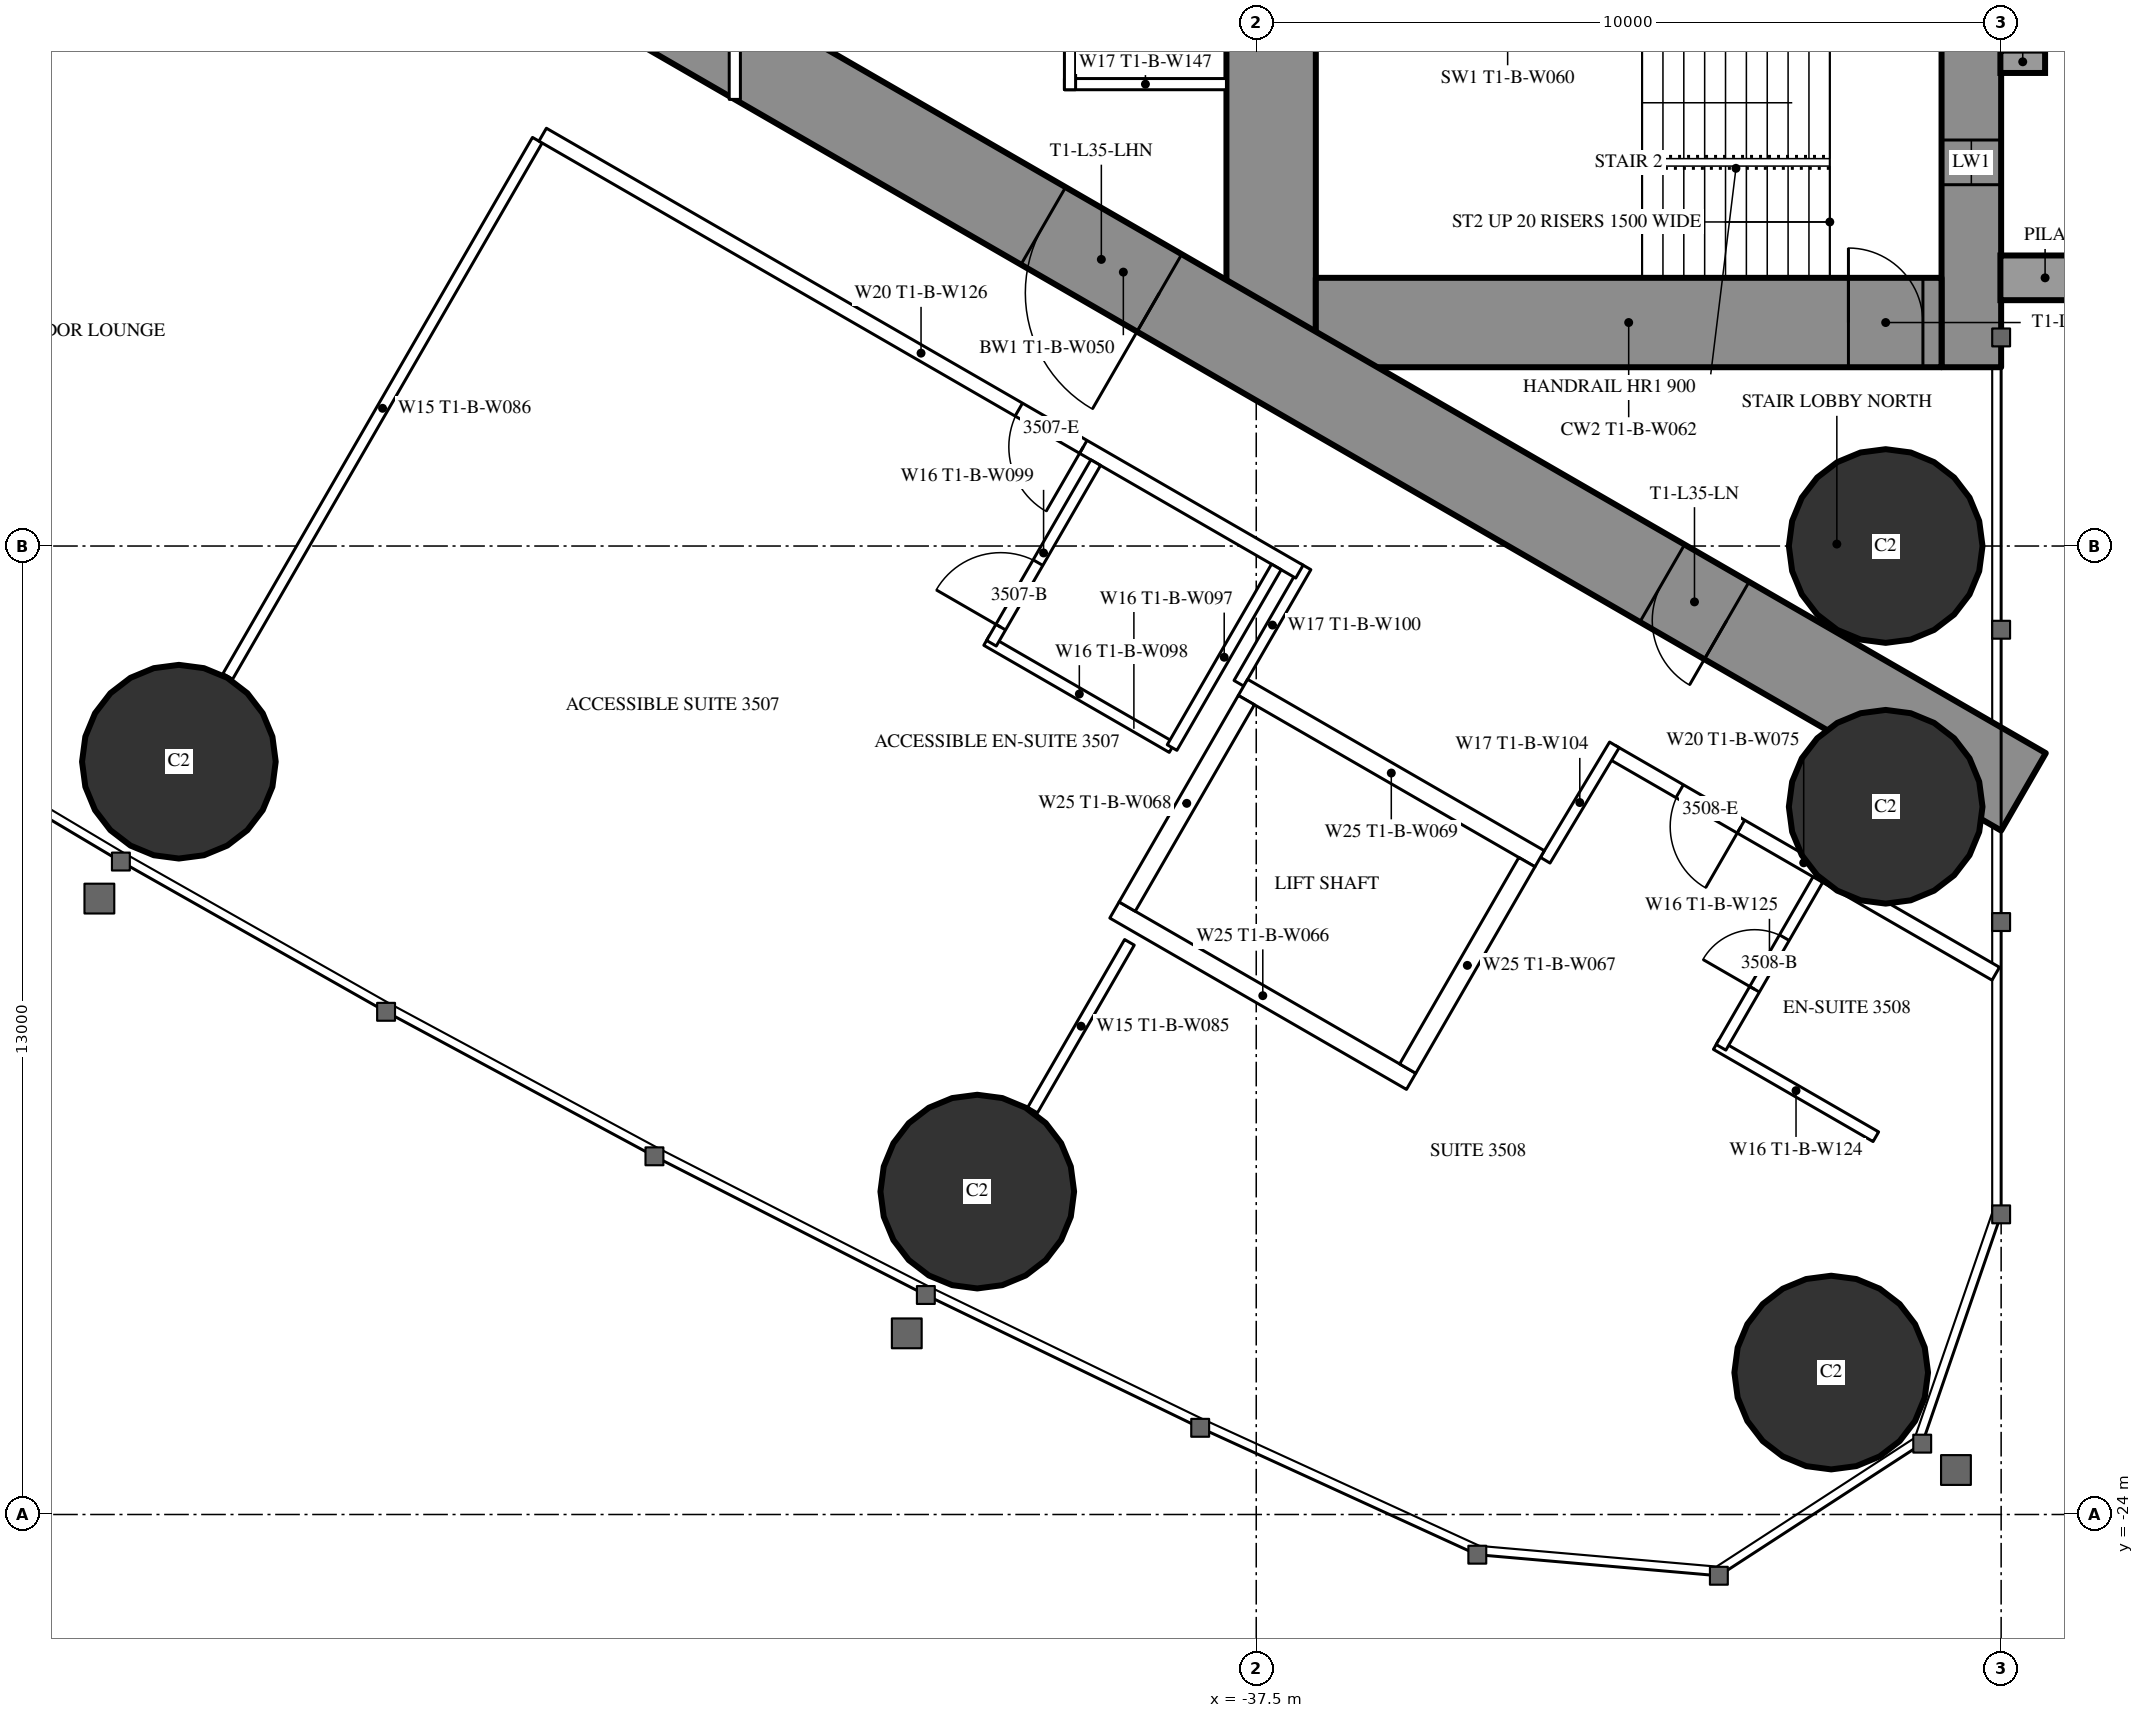
"""IFC4 building model, lengths in metres.
Left out: names, types, materials, properties, quantities, classifications, styles, units other than length and angle.
Written with IfcOpenShell. Run it as: python <this file> out.ifc"""

import sys

from ifc_helpers import new_model, si_unit, direction, frame, frame_2d, origin, origin_2d, place, context, subcontext, project, spatial, rectangle, hollow_circle, extrude, element, fill, save


model = new_model("IFC4")
c1 = context("Model", 3, precision=1e-05, world=origin(), true_north=direction((0.0, 1.0)))
c2 = subcontext(c1, "Body", "Model", "MODEL_VIEW")
j1 = project(units=[si_unit("LENGTHUNIT", "METRE"), si_unit("PLANEANGLEUNIT", "RADIAN")], contexts=[c1])
p1 = place(None, origin())
s1 = spatial("IfcSite", under=j1, at=p1, CompositionType="ELEMENT")
p2 = place(p1, origin())
s2 = spatial("IfcBuilding", under=s1, at=p2, CompositionType="ELEMENT")
p3 = place(p2, frame((0.0, 0.0, 132.6)))
s3 = spatial("IfcBuildingStorey", under=s2, at=p3, CompositionType="ELEMENT", Elevation=132.6)
for number, where, z_axis, x_axis in (
    (1, (-29.781, -22.095, 0.0), (0.0, 0.0, 1.0), (1.0, 0.0, 0.0)),
    (2, (-29.05, -11.0, 0.0), (0.0, 0.0, 1.0), (1.0, 0.0, 0.0)),
    (3, (-29.05, -14.5, 0.0), (0.0, 0.0, 1.0), (1.0, 0.0, 0.0)),
    (4, (-51.963, -13.895, 0.0), (0.0, 0.0, 1.0), (1.0, 0.0, 0.0)),
    (5, (-41.245, -19.666, 0.0), (0.0, 0.0, 1.0), (1.0, 0.0, 0.0)),
):
    element("IfcColumn", number, at=place(p3, frame(where, z_axis=z_axis, x_axis=x_axis)), inside=s3, PredefinedType="COLUMN", context=c2, shape_type="SweptSolid", body=[
        extrude(hollow_circle(Radius=1.3, WallThickness=0.1, at=origin_2d()), origin(), (0.0, 0.0, 1.0), 3.5),
    ])
p4 = place(p3, frame((-27.9, 8.6, 0.0), z_axis=(0.0, 0.0, 1.0), x_axis=(0.0, -1.0, 0.0)))
e6 = element("IfcWall", 6, at=p4, inside=s3, PredefinedType="SHEAR", context=c2, shape_type="SweptSolid", body=[
    extrude(rectangle(XDim=17.2, YDim=0.8, at=frame_2d((8.6, 0.0))), origin(), (0.0, 0.0, 1.0), 3.5),
])
p5 = place(p4, frame((2.45, 0.0, 0.6)))
e7 = element("IfcOpeningElement", 7, at=p5, cuts=e6, PredefinedType="OPENING", context=c2, shape_type="SweptSolid", body=[
    extrude(rectangle(XDim=0.6, YDim=2.1, at=frame_2d((0.3, 1.05))), frame((0.0, 0.41, 0.0), z_axis=(0.0, -1.0, 0.0), x_axis=(1.0, 0.0, 0.0)), (0.0, 0.0, 1.0), 0.82),
])
p6 = place(p4, frame((14.15, 0.0, 0.6)))
e8 = element("IfcOpeningElement", 8, at=p6, cuts=e6, PredefinedType="OPENING", context=c2, shape_type="SweptSolid", body=[
    extrude(rectangle(XDim=0.6, YDim=2.1, at=frame_2d((0.3, 1.05))), frame((0.0, 0.41, 0.0), z_axis=(0.0, -1.0, 0.0), x_axis=(1.0, 0.0, 0.0)), (0.0, 0.0, 1.0), 0.82),
])
p7 = place(p3, frame((-37.3, 8.6, 0.0), z_axis=(0.0, 0.0, 1.0), x_axis=(0.0, -1.0, 0.0)))
e9 = element("IfcWall", 9, at=p7, inside=s3, PredefinedType="SHEAR", context=c2, shape_type="SweptSolid", body=[
    extrude(rectangle(XDim=17.2, YDim=1.2, at=frame_2d((8.6, 0.0))), origin(), (0.0, 0.0, 1.0), 3.5),
])
p8 = place(p7, frame((7.7, 0.0, 0.0)))
e10 = element("IfcOpeningElement", 10, at=p8, cuts=e9, PredefinedType="OPENING", context=c2, shape_type="SweptSolid", body=[
    extrude(rectangle(XDim=1.8, YDim=2.2, at=frame_2d((0.9, 1.1))), frame((0.0, 0.61, 0.0), z_axis=(0.0, -1.0, 0.0), x_axis=(1.0, 0.0, 0.0)), (0.0, 0.0, 1.0), 1.22),
])
p9 = place(p3, frame((-28.3, -8.0, 0.0), z_axis=(0.0, 0.0, 1.0), x_axis=(-1.0, 0.0, 0.0)))
e11 = element("IfcWall", 11, at=p9, inside=s3, PredefinedType="SHEAR", context=c2, shape_type="SweptSolid", body=[
    extrude(rectangle(XDim=8.4, YDim=1.2, at=frame_2d((4.2, 0.0))), origin(), (0.0, 0.0, 1.0), 3.5),
])
p10 = place(p9, frame((0.25, 0.0, 0.0)))
e12 = element("IfcOpeningElement", 12, at=p10, cuts=e11, PredefinedType="OPENING", context=c2, shape_type="SweptSolid", body=[
    extrude(rectangle(XDim=1.0, YDim=2.2, at=frame_2d((0.5, 1.1))), frame((0.0, 0.61, 0.0), z_axis=(0.0, -1.0, 0.0), x_axis=(1.0, 0.0, 0.0)), (0.0, 0.0, 1.0), 1.22),
])
p11 = place(p3, frame((-27.2, -14.3, 0.0), z_axis=(0.0, 0.0, 1.0), x_axis=(-0.866024021859, 0.500002393557, 0.0)))
e13 = element("IfcWall", 13, at=p11, inside=s3, PredefinedType="SHEAR", context=c2, shape_type="SweptSolid", body=[
    extrude(rectangle(XDim=27.907, YDim=1.2, at=frame_2d((13.954, 0.0))), origin(), (0.0, 0.0, 1.0), 3.5),
])
p12 = place(p11, frame((4.6, 0.0, 0.0)))
e14 = element("IfcOpeningElement", 14, at=p12, cuts=e13, PredefinedType="OPENING", context=c2, shape_type="SweptSolid", body=[
    extrude(rectangle(XDim=1.0, YDim=2.2, at=frame_2d((0.5, 1.1))), frame((0.0, 0.61, 0.0), z_axis=(0.0, -1.0, 0.0), x_axis=(1.0, 0.0, 0.0)), (0.0, 0.0, 1.0), 1.22),
])
p13 = place(p11, frame((13.395, 0.0, 0.0)))
e15 = element("IfcOpeningElement", 15, at=p13, cuts=e13, PredefinedType="OPENING", context=c2, shape_type="SweptSolid", body=[
    extrude(rectangle(XDim=1.8, YDim=2.2, at=frame_2d((0.9, 1.1))), frame((0.0, 0.61, 0.0), z_axis=(0.0, -1.0, 0.0), x_axis=(1.0, 0.0, 0.0)), (0.0, 0.0, 1.0), 1.22),
])
p14 = place(p3, frame((-47.151, -5.552, 0.0), z_axis=(0.0, 0.0, 1.0), x_axis=(-0.500003012045, -0.866023664773, 0.0)))
e16 = element("IfcWall", 16, at=p14, inside=s3, PredefinedType="PARTITIONING", context=c2, shape_type="SweptSolid", body=[
    extrude(rectangle(XDim=8.311, YDim=0.15, at=frame_2d((4.156, 0.0))), origin(), (0.0, 0.0, 1.0), 2.2),
])
p15 = place(p3, frame((-39.202, -16.32, 0.0), z_axis=(0.0, 0.0, 1.0), x_axis=(-0.49997716683, -0.86603858612, 0.0)))
e17 = element("IfcWall", 17, at=p15, inside=s3, PredefinedType="PARTITIONING", context=c2, shape_type="SweptSolid", body=[
    extrude(rectangle(XDim=2.6, YDim=0.15, at=frame_2d((1.3, 0.0))), origin(), (0.0, 0.0, 1.0), 3.25),
])
p16 = place(p3, frame((-27.572, -16.741, 0.0), z_axis=(0.0, 0.0, 1.0), x_axis=(-0.866024464444, 0.500001626982, 0.0)))
e18 = element("IfcWall", 18, at=p16, inside=s3, PredefinedType="PARTITIONING", context=c2, shape_type="SweptSolid", body=[
    extrude(rectangle(XDim=5.955, YDim=0.2, at=frame_2d((2.978, 0.0))), origin(), (0.0, 0.0, 1.0), 3.25),
])
p17 = place(p16, frame((3.95, 0.0, 0.0)))
e19 = element("IfcOpeningElement", 19, at=p17, cuts=e18, PredefinedType="OPENING", context=c2, shape_type="SweptSolid", body=[
    extrude(rectangle(XDim=0.95, YDim=2.2, at=frame_2d((0.475, 1.1))), frame((0.0, 0.11, 0.0), z_axis=(0.0, -1.0, 0.0), x_axis=(1.0, 0.0, 0.0)), (0.0, 0.0, 1.0), 0.22),
])
p18 = place(p3, frame((-36.831, -11.28, 0.0), z_axis=(0.0, 0.0, 1.0), x_axis=(-0.499937177781, -0.866061671171, 0.0)))
e20 = element("IfcWall", 20, at=p18, inside=s3, PredefinedType="PARTITIONING", context=c2, shape_type="SweptSolid", body=[
    extrude(rectangle(XDim=1.804, YDim=0.15, at=frame_2d((0.902, 0.0))), origin(), (0.0, 0.0, 1.0), 3.25),
])
p19 = place(p3, frame((-33.621, -15.218, 0.0), z_axis=(0.0, 0.0, 1.0), x_axis=(0.514336634837, 0.857588377991, 0.0)))
e21 = element("IfcWall", 21, at=p19, inside=s3, PredefinedType="PARTITIONING", context=c2, shape_type="SweptSolid", body=[
    extrude(rectangle(XDim=1.805, YDim=0.15, at=frame_2d((0.903, 0.0))), origin(), (0.0, 0.0, 1.0), 3.25),
])
p20 = place(p3, frame((-36.92, -11.344, 0.0), z_axis=(0.0, 0.0, 1.0), x_axis=(-0.866027897759, 0.499995680284, 0.0)))
e22 = element("IfcWall", 22, at=p20, inside=s3, PredefinedType="PARTITIONING", context=c2, shape_type="SweptSolid", body=[
    extrude(rectangle(XDim=11.731, YDim=0.2, at=frame_2d((5.865, 0.0))), origin(), (0.0, 0.0, 1.0), 3.25),
])
p21 = place(p20, frame((3.35, 0.0, 0.0)))
e23 = element("IfcOpeningElement", 23, at=p21, cuts=e22, PredefinedType="OPENING", context=c2, shape_type="SweptSolid", body=[
    extrude(rectangle(XDim=1.0, YDim=2.2, at=frame_2d((0.5, 1.1))), frame((0.0, 0.11, 0.0), z_axis=(0.0, -1.0, 0.0), x_axis=(1.0, 0.0, 0.0)), (0.0, 0.0, 1.0), 0.22),
])
p22 = place(p3, frame((-38.63, -13.705, 0.0), z_axis=(0.0, 0.0, 1.0), x_axis=(-0.866018712932, 0.500011588718, 0.0)))
e24 = element("IfcWall", 24, at=p22, inside=s3, PredefinedType="PARTITIONING", context=c2, shape_type="SweptSolid", body=[
    extrude(rectangle(XDim=2.875, YDim=0.15, at=frame_2d((1.438, 0.0))), origin(), (0.0, 0.0, 1.0), 3.25),
])
p23 = place(p3, frame((-39.655, -9.88, 0.0), z_axis=(0.0, 0.0, 1.0), x_axis=(-0.500049511043, -0.865996816683, 0.0)))
e25 = element("IfcWall", 25, at=p23, inside=s3, PredefinedType="PARTITIONING", context=c2, shape_type="SweptSolid", body=[
    extrude(rectangle(XDim=2.8, YDim=0.15, at=frame_2d((1.4, 0.0))), origin(), (0.0, 0.0, 1.0), 3.25),
])
p24 = place(p23, frame((1.55, 0.0, 0.0)))
e26 = element("IfcOpeningElement", 26, at=p24, cuts=e25, PredefinedType="OPENING", context=c2, shape_type="SweptSolid", body=[
    extrude(rectangle(XDim=1.0, YDim=2.2, at=frame_2d((0.5, 1.1))), frame((0.0, 0.085, 0.0), z_axis=(0.0, -1.0, 0.0), x_axis=(1.0, 0.0, 0.0)), (0.0, 0.0, 1.0), 0.17),
])
p25 = place(p3, frame((-37.23, -11.281, 0.0), z_axis=(0.0, 0.0, 1.0), x_axis=(-0.500049511043, -0.865996816683, 0.0)))
e27 = element("IfcWall", 27, at=p25, inside=s3, PredefinedType="PARTITIONING", context=c2, shape_type="SweptSolid", body=[
    extrude(rectangle(XDim=2.8, YDim=0.15, at=frame_2d((1.4, 0.0))), origin(), (0.0, 0.0, 1.0), 3.25),
])
p26 = place(p3, frame((-29.182, -18.929, 0.0), z_axis=(0.0, 0.0, 1.0), x_axis=(-0.866006523861, 0.500032699561, 0.0)))
e28 = element("IfcWall", 28, at=p26, inside=s3, PredefinedType="PARTITIONING", context=c2, shape_type="SweptSolid", body=[
    extrude(rectangle(XDim=2.475, YDim=0.15, at=frame_2d((1.237, 0.0))), origin(), (0.0, 0.0, 1.0), 3.25),
])
p27 = place(p3, frame((-29.96, -15.478, 0.0), z_axis=(0.0, 0.0, 1.0), x_axis=(-0.500006934395, -0.866021400173, 0.0)))
e29 = element("IfcWall", 29, at=p27, inside=s3, PredefinedType="PARTITIONING", context=c2, shape_type="SweptSolid", body=[
    extrude(rectangle(XDim=2.6, YDim=0.15, at=frame_2d((1.3, 0.0))), origin(), (0.0, 0.0, 1.0), 3.25),
])
p28 = place(p27, frame((0.9, 0.0, 0.0)))
e30 = element("IfcOpeningElement", 30, at=p28, cuts=e29, PredefinedType="OPENING", context=c2, shape_type="SweptSolid", body=[
    extrude(rectangle(XDim=0.8, YDim=2.2, at=frame_2d((0.4, 1.1))), frame((0.0, 0.085, 0.0), z_axis=(0.0, -1.0, 0.0), x_axis=(1.0, 0.0, 0.0)), (0.0, 0.0, 1.0), 0.17),
])
p29 = place(p3, frame((-37.9, -4.8, 0.0), z_axis=(0.0, 0.0, 1.0), x_axis=(-1.0, 0.0, 0.0)))
e31 = element("IfcWall", 31, at=p29, inside=s3, PredefinedType="PARTITIONING", context=c2, shape_type="SweptSolid", body=[
    extrude(rectangle(XDim=2.175, YDim=0.15, at=frame_2d((1.087, 0.0))), origin(), (0.0, 0.0, 1.0), 3.25),
])
p30 = place(p3, frame((-40.0, -1.125, 0.0), z_axis=(0.0, 0.0, 1.0), x_axis=(0.0, -1.0, 0.0)))
e32 = element("IfcWall", 32, at=p30, inside=s3, PredefinedType="PARTITIONING", context=c2, shape_type="SweptSolid", body=[
    extrude(rectangle(XDim=3.75, YDim=0.15, at=frame_2d((1.875, 0.0))), origin(), (0.0, 0.0, 1.0), 3.25),
])
p31 = place(p30, frame((1.375, 0.0, 0.0)))
e33 = element("IfcOpeningElement", 33, at=p31, cuts=e32, PredefinedType="OPENING", context=c2, shape_type="SweptSolid", body=[
    extrude(rectangle(XDim=1.0, YDim=2.2, at=frame_2d((0.5, 1.1))), frame((0.0, 0.085, 0.0), z_axis=(0.0, -1.0, 0.0), x_axis=(1.0, 0.0, 0.0)), (0.0, 0.0, 1.0), 0.17),
])
p32 = place(p3, frame((-44.5, 5.005, 0.0), z_axis=(0.0, 0.0, 1.0), x_axis=(0.0, -1.0, 0.0)))
e34 = element("IfcWall", 34, at=p32, inside=s3, PredefinedType="PARTITIONING", context=c2, shape_type="SweptSolid", body=[
    extrude(rectangle(XDim=10.009, YDim=0.15, at=frame_2d((5.005, 0.0))), origin(), (0.0, 0.0, 1.0), 2.45),
])
p33 = place(p32, frame((4.505, 0.0, 0.0)))
e35 = element("IfcOpeningElement", 35, at=p33, cuts=e34, PredefinedType="OPENING", context=c2, shape_type="SweptSolid", body=[
    extrude(rectangle(XDim=1.0, YDim=2.2, at=frame_2d((0.5, 1.1))), frame((0.0, 0.085, 0.0), z_axis=(0.0, -1.0, 0.0), x_axis=(1.0, 0.0, 0.0)), (0.0, 0.0, 1.0), 0.17),
])
p34 = place(p3, frame((-33.696, -15.197, 0.0), z_axis=(0.0, 0.0, 1.0), x_axis=(-0.865976953817, 0.500083908417, 0.0)))
e36 = element("IfcWall", 36, at=p34, inside=s3, PredefinedType="PARTITIONING", context=c2, shape_type="SweptSolid", body=[
    extrude(rectangle(XDim=4.599, YDim=0.25, at=frame_2d((2.3, 0.0))), origin(), (0.0, 0.0, 1.0), 3.25),
])
p35 = place(p3, frame((-35.42, -18.186, 0.0), z_axis=(0.0, 0.0, 1.0), x_axis=(-0.865990227814, 0.50006092162, 0.0)))
e37 = element("IfcWall", 37, at=p35, inside=s3, PredefinedType="PARTITIONING", context=c2, shape_type="SweptSolid", body=[
    extrude(rectangle(XDim=4.6, YDim=0.25, at=frame_2d((2.3, 0.0))), origin(), (0.0, 0.0, 1.0), 3.25),
])
p36 = place(p3, frame((-33.866, -15.243, 0.0), z_axis=(0.0, 0.0, 1.0), x_axis=(-0.499929347863, -0.866066190972, 0.0)))
e38 = element("IfcWall", 38, at=p36, inside=s3, PredefinedType="PARTITIONING", context=c2, shape_type="SweptSolid", body=[
    extrude(rectangle(XDim=3.201, YDim=0.25, at=frame_2d((1.6, 0.0))), origin(), (0.0, 0.0, 1.0), 3.25),
])
p37 = place(p3, frame((-37.633, -13.068, 0.0), z_axis=(0.0, 0.0, 1.0), x_axis=(-0.499872130319, -0.866099216793, 0.0)))
e39 = element("IfcWall", 39, at=p37, inside=s3, PredefinedType="PARTITIONING", context=c2, shape_type="SweptSolid", body=[
    extrude(rectangle(XDim=3.2, YDim=0.25, at=frame_2d((1.6, 0.0))), origin(), (0.0, 0.0, 1.0), 3.25),
])
p38 = place(p24, origin())
e40 = element("IfcDoor", 40, at=p38, inside=s3, OperationType="SINGLE_SWING_RIGHT", PredefinedType="DOOR", context=c2, shape_type="SweptSolid", body=[
    extrude(rectangle(XDim=1.0, YDim=2.2, at=frame_2d((0.5, 1.1))), frame((0.0, 0.025, 0.0), z_axis=(0.0, -1.0, 0.0), x_axis=(1.0, 0.0, 0.0)), (0.0, 0.0, 1.0), 0.05),
])
fill(e26, e40)
p39 = place(p21, origin())
e41 = element("IfcDoor", 41, at=p39, inside=s3, OperationType="SINGLE_SWING_LEFT", PredefinedType="DOOR", context=c2, shape_type="SweptSolid", body=[
    extrude(rectangle(XDim=1.0, YDim=2.2, at=frame_2d((0.5, 1.1))), frame((0.0, 0.025, 0.0), z_axis=(0.0, -1.0, 0.0), x_axis=(1.0, 0.0, 0.0)), (0.0, 0.0, 1.0), 0.05),
])
fill(e23, e41)
p40 = place(p28, origin())
e42 = element("IfcDoor", 42, at=p40, inside=s3, OperationType="SINGLE_SWING_RIGHT", PredefinedType="DOOR", context=c2, shape_type="SweptSolid", body=[
    extrude(rectangle(XDim=0.8, YDim=2.2, at=frame_2d((0.4, 1.1))), frame((0.0, 0.025, 0.0), z_axis=(0.0, -1.0, 0.0), x_axis=(1.0, 0.0, 0.0)), (0.0, 0.0, 1.0), 0.05),
])
fill(e30, e42)
p41 = place(p17, origin())
e43 = element("IfcDoor", 43, at=p41, inside=s3, OperationType="SINGLE_SWING_LEFT", PredefinedType="DOOR", context=c2, shape_type="SweptSolid", body=[
    extrude(rectangle(XDim=0.95, YDim=2.2, at=frame_2d((0.475, 1.1))), frame((0.0, 0.025, 0.0), z_axis=(0.0, -1.0, 0.0), x_axis=(1.0, 0.0, 0.0)), (0.0, 0.0, 1.0), 0.05),
])
fill(e19, e43)
p42 = place(p12, origin())
e44 = element("IfcDoor", 44, at=p42, inside=s3, OperationType="SINGLE_SWING_LEFT", PredefinedType="DOOR", context=c2, shape_type="SweptSolid", body=[
    extrude(rectangle(XDim=1.0, YDim=2.2, at=frame_2d((0.5, 1.1))), frame((0.0, 0.025, 0.0), z_axis=(0.0, -1.0, 0.0), x_axis=(1.0, 0.0, 0.0)), (0.0, 0.0, 1.0), 0.05),
])
fill(e14, e44)
p43 = place(p13, origin())
e45 = element("IfcDoor", 45, at=p43, inside=s3, OperationType="DOUBLE_DOOR_SINGLE_SWING", PredefinedType="DOOR", context=c2, shape_type="SweptSolid", body=[
    extrude(rectangle(XDim=1.8, YDim=2.2, at=frame_2d((0.9, 1.1))), frame((0.0, 0.025, 0.0), z_axis=(0.0, -1.0, 0.0), x_axis=(1.0, 0.0, 0.0)), (0.0, 0.0, 1.0), 0.05),
])
fill(e15, e45)
p44 = place(p10, origin())
e46 = element("IfcDoor", 46, at=p44, inside=s3, OperationType="SINGLE_SWING_RIGHT", PredefinedType="DOOR", context=c2, shape_type="SweptSolid", body=[
    extrude(rectangle(XDim=1.0, YDim=2.2, at=frame_2d((0.5, 1.1))), frame((0.0, 0.025, 0.0), z_axis=(0.0, -1.0, 0.0), x_axis=(1.0, 0.0, 0.0)), (0.0, 0.0, 1.0), 0.05),
])
fill(e12, e46)
p45 = place(p6, origin())
e47 = element("IfcWindow", 47, at=p45, inside=s3, PartitioningType="SINGLE_PANEL", PredefinedType="WINDOW", context=c2, shape_type="SweptSolid", body=[
    extrude(rectangle(XDim=0.6, YDim=2.1, at=frame_2d((0.3, 1.05))), frame((0.0, 0.03, 0.0), z_axis=(0.0, -1.0, 0.0), x_axis=(1.0, 0.0, 0.0)), (0.0, 0.0, 1.0), 0.06),
])
fill(e8, e47)
save(model, sys.argv[1])
